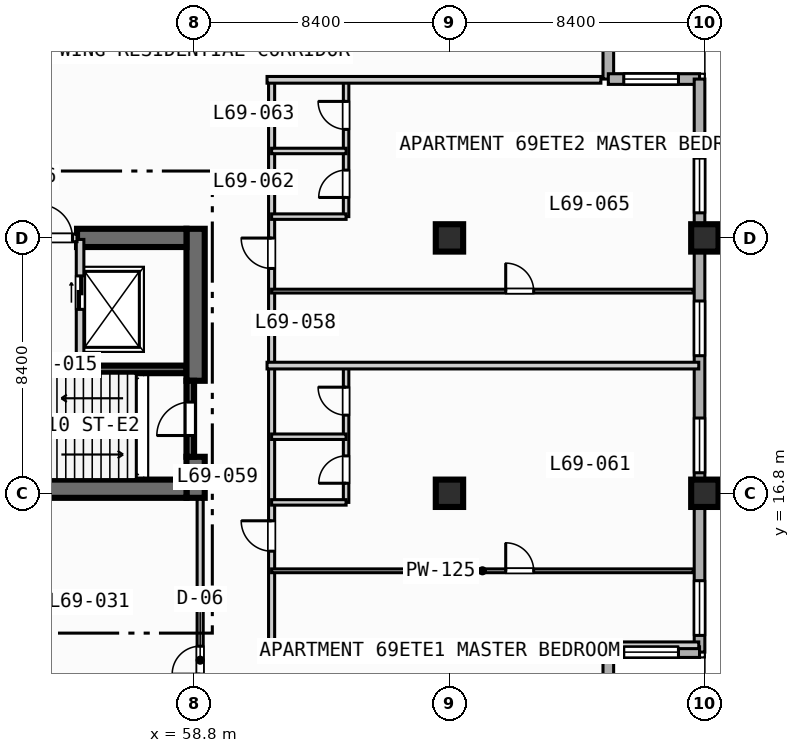
"""IFC4 building model, lengths in metres.
Left out: names, types, materials, properties, quantities, classifications, styles, units other than length and angle.
Written with IfcOpenShell. Run it as: python <this file> out.ifc"""

import sys

from ifc_helpers import new_model, si_unit, direction, frame, frame_2d, origin, origin_2d, place, context, subcontext, project, spatial, rectangle, extrude, element, fill, save


model = new_model("IFC4")
c1 = context("Model", 3, precision=1e-05, world=origin(), true_north=direction((0.0, 1.0)))
c2 = subcontext(c1, "Body", "Model", "MODEL_VIEW")
j1 = project(units=[si_unit("LENGTHUNIT", "METRE"), si_unit("PLANEANGLEUNIT", "RADIAN")], contexts=[c1])
p1 = place(None, origin())
s1 = spatial("IfcSite", under=j1, at=p1, CompositionType="ELEMENT")
p2 = place(p1, origin())
s2 = spatial("IfcBuilding", under=s1, at=p2, CompositionType="ELEMENT")
p3 = place(p2, frame((0.0, 0.0, 278.6)))
s3 = spatial("IfcBuildingStorey", under=s2, at=p3, CompositionType="ELEMENT", Elevation=278.6)
p4 = place(p3, frame((50.5, 20.875, 0.0), z_axis=(0.0, 0.0, 1.0), x_axis=(1.0, 0.0, 0.0)))
e1 = element("IfcWall", 1, at=p4, inside=s3, PredefinedType="SOLIDWALL", context=c2, shape_type="SweptSolid", body=[
    extrude(rectangle(XDim=8.05, YDim=0.25, at=frame_2d((4.025, 0.0))), origin(), (0.0, 0.0, 1.0), 3.47),
])
p5 = place(p3, frame((58.85, 16.65, 0.0), z_axis=(0.0, 0.0, 1.0), x_axis=(0.0, 1.0, 0.0)))
e2 = element("IfcWall", 2, at=p5, inside=s3, PredefinedType="SHEAR", context=c2, shape_type="SweptSolid", body=[
    extrude(rectangle(XDim=1.35, YDim=0.6, at=frame_2d((0.675, 0.0))), origin(), (0.0, 0.0, 1.0), 3.47),
])
p6 = place(p3, frame((58.85, 20.5, 0.0), z_axis=(0.0, 0.0, 1.0), x_axis=(0.0, 1.0, 0.0)))
e3 = element("IfcWall", 3, at=p6, inside=s3, PredefinedType="SHEAR", context=c2, shape_type="SweptSolid", body=[
    extrude(rectangle(XDim=5.0, YDim=0.6, at=frame_2d((2.5, 0.0))), origin(), (0.0, 0.0, 1.0), 3.47),
])
p7 = place(p3, frame((42.2, 16.95, 0.0), z_axis=(0.0, 0.0, 1.0), x_axis=(1.0, 0.0, 0.0)))
e4 = element("IfcWall", 4, at=p7, inside=s3, PredefinedType="SHEAR", context=c2, shape_type="SweptSolid", body=[
    extrude(rectangle(XDim=16.35, YDim=0.6, at=frame_2d((8.175, 0.0))), origin(), (0.0, 0.0, 1.0), 3.47),
])
p8 = place(p3, frame((54.95, 25.2, 0.0), z_axis=(0.0, 0.0, 1.0), x_axis=(1.0, 0.0, 0.0)))
e5 = element("IfcWall", 5, at=p8, inside=s3, PredefinedType="SHEAR", context=c2, shape_type="SweptSolid", body=[
    extrude(rectangle(XDim=3.6, YDim=0.6, at=frame_2d((1.8, 0.0))), origin(), (0.0, 0.0, 1.0), 3.47),
])
for number, where, z_axis, x_axis in (
    (6, (67.2, 16.8, 0.0), (0.0, 0.0, 1.0), (1.0, 0.0, 0.0)),
    (7, (67.2, 25.2, 0.0), (0.0, 0.0, 1.0), (1.0, 0.0, 0.0)),
    (8, (75.6, 16.8, 0.0), (0.0, 0.0, 1.0), (1.0, 0.0, 0.0)),
    (9, (75.6, 25.2, 0.0), (0.0, 0.0, 1.0), (1.0, 0.0, 0.0)),
):
    element("IfcColumn", number, at=place(p3, frame(where, z_axis=z_axis, x_axis=x_axis)), inside=s3, PredefinedType="COLUMN", context=c2, shape_type="SweptSolid", body=[
        extrude(rectangle(XDim=0.9, YDim=0.9, at=origin_2d()), origin(), (0.0, 0.0, 1.0), 3.7),
    ])
p9 = place(p3, frame((72.425, 33.425, 0.0), z_axis=(0.0, 0.0, 1.0), x_axis=(0.0, -1.0, 0.0)))
e10 = element("IfcWall", 10, at=p9, inside=s3, PredefinedType="STANDARD", context=c2, shape_type="SweptSolid", body=[
    extrude(rectangle(XDim=3.0, YDim=0.35, at=frame_2d((1.5, 0.0))), origin(), (0.0, 0.0, 1.0), 3.47),
])
p10 = place(p3, frame((72.425, 30.425, 0.0), z_axis=(0.0, 0.0, 1.0), x_axis=(1.0, 0.0, 0.0)))
e11 = element("IfcWall", 11, at=p10, inside=s3, PredefinedType="STANDARD", context=c2, shape_type="SweptSolid", body=[
    extrude(rectangle(XDim=3.0, YDim=0.35, at=frame_2d((1.5, 0.0))), origin(), (0.0, 0.0, 1.0), 3.47),
])
p11 = place(p10, frame((0.508, 0.0, 0.85)))
e12 = element("IfcOpeningElement", 12, at=p11, cuts=e11, PredefinedType="OPENING", context=c2, shape_type="SweptSolid", body=[
    extrude(rectangle(XDim=1.8, YDim=1.8, at=frame_2d((0.9, 0.9))), frame((0.0, 0.185, 0.0), z_axis=(0.0, -1.0, 0.0), x_axis=(1.0, 0.0, 0.0)), (0.0, 0.0, 1.0), 0.37),
])
p12 = place(p3, frame((75.425, 30.425, 0.0), z_axis=(0.0, 0.0, 1.0), x_axis=(0.0, -1.0, 0.0)))
e13 = element("IfcWall", 13, at=p12, inside=s3, PredefinedType="STANDARD", context=c2, shape_type="SweptSolid", body=[
    extrude(rectangle(XDim=18.85, YDim=0.35, at=frame_2d((9.425, 0.0))), origin(), (0.0, 0.0, 1.0), 3.47),
])
p13 = place(p12, frame((16.5, 0.0, 0.85)))
e14 = element("IfcOpeningElement", 14, at=p13, cuts=e13, PredefinedType="OPENING", context=c2, shape_type="SweptSolid", body=[
    extrude(rectangle(XDim=1.8, YDim=1.8, at=frame_2d((0.9, 0.9))), frame((0.0, 0.185, 0.0), z_axis=(0.0, -1.0, 0.0), x_axis=(1.0, 0.0, 0.0)), (0.0, 0.0, 1.0), 0.37),
])
p14 = place(p12, frame((11.15, 0.0, 0.85)))
e15 = element("IfcOpeningElement", 15, at=p14, cuts=e13, PredefinedType="OPENING", context=c2, shape_type="SweptSolid", body=[
    extrude(rectangle(XDim=1.8, YDim=1.8, at=frame_2d((0.9, 0.9))), frame((0.0, 0.185, 0.0), z_axis=(0.0, -1.0, 0.0), x_axis=(1.0, 0.0, 0.0)), (0.0, 0.0, 1.0), 0.37),
])
p15 = place(p12, frame((7.3, 0.0, 0.85)))
e16 = element("IfcOpeningElement", 16, at=p15, cuts=e13, PredefinedType="OPENING", context=c2, shape_type="SweptSolid", body=[
    extrude(rectangle(XDim=1.8, YDim=1.8, at=frame_2d((0.9, 0.9))), frame((0.0, 0.185, 0.0), z_axis=(0.0, -1.0, 0.0), x_axis=(1.0, 0.0, 0.0)), (0.0, 0.0, 1.0), 0.37),
])
p16 = place(p12, frame((2.6, 0.0, 0.85)))
e17 = element("IfcOpeningElement", 17, at=p16, cuts=e13, PredefinedType="OPENING", context=c2, shape_type="SweptSolid", body=[
    extrude(rectangle(XDim=1.8, YDim=1.8, at=frame_2d((0.9, 0.9))), frame((0.0, 0.185, 0.0), z_axis=(0.0, -1.0, 0.0), x_axis=(1.0, 0.0, 0.0)), (0.0, 0.0, 1.0), 0.37),
])
p17 = place(p3, frame((75.425, 11.575, 0.0), z_axis=(0.0, 0.0, 1.0), x_axis=(-1.0, 0.0, 0.0)))
e18 = element("IfcWall", 18, at=p17, inside=s3, PredefinedType="STANDARD", context=c2, shape_type="SweptSolid", body=[
    extrude(rectangle(XDim=3.0, YDim=0.35, at=frame_2d((1.5, 0.0))), origin(), (0.0, 0.0, 1.0), 3.47),
])
p18 = place(p17, frame((0.692, 0.0, 0.85)))
e19 = element("IfcOpeningElement", 19, at=p18, cuts=e18, PredefinedType="OPENING", context=c2, shape_type="SweptSolid", body=[
    extrude(rectangle(XDim=1.8, YDim=1.8, at=frame_2d((0.9, 0.9))), frame((0.0, 0.185, 0.0), z_axis=(0.0, -1.0, 0.0), x_axis=(1.0, 0.0, 0.0)), (0.0, 0.0, 1.0), 0.37),
])
p19 = place(p3, frame((72.425, 11.575, 0.0), z_axis=(0.0, 0.0, 1.0), x_axis=(0.0, -1.0, 0.0)))
e20 = element("IfcWall", 20, at=p19, inside=s3, PredefinedType="STANDARD", context=c2, shape_type="SweptSolid", body=[
    extrude(rectangle(XDim=3.0, YDim=0.35, at=frame_2d((1.5, 0.0))), origin(), (0.0, 0.0, 1.0), 3.47),
])
p20 = place(p3, frame((58.675, 18.0, 0.0), z_axis=(0.0, 0.0, 1.0), x_axis=(0.0, 1.0, 0.0)))
e21 = element("IfcWall", 21, at=p20, inside=s3, PredefinedType="SOLIDWALL", context=c2, shape_type="SweptSolid", body=[
    extrude(rectangle(XDim=2.5, YDim=0.25, at=frame_2d((1.25, 0.0))), origin(), (0.0, 0.0, 1.0), 3.47),
])
p21 = place(p20, frame((0.7, 0.0, 0.0)))
e22 = element("IfcOpeningElement", 22, at=p21, cuts=e21, PredefinedType="OPENING", context=c2, shape_type="SweptSolid", body=[
    extrude(rectangle(XDim=1.1, YDim=2.15, at=frame_2d((0.55, 1.075))), frame((0.0, 0.135, 0.0), z_axis=(0.0, -1.0, 0.0), x_axis=(1.0, 0.0, 0.0)), (0.0, 0.0, 1.0), 0.27),
])
p22 = place(p3, frame((55.05, 21.0, 0.0), z_axis=(0.0, 0.0, 1.0), x_axis=(0.0, 1.0, 0.0)))
e23 = element("IfcWall", 23, at=p22, inside=s3, PredefinedType="SOLIDWALL", context=c2, shape_type="SweptSolid", body=[
    extrude(rectangle(XDim=4.15, YDim=0.25, at=frame_2d((2.075, 0.0))), origin(), (0.0, 0.0, 1.0), 3.47),
])
p23 = place(p22, frame((1.85, 0.0, 0.0)))
e24 = element("IfcOpeningElement", 24, at=p23, cuts=e23, PredefinedType="OPENING", context=c2, shape_type="SweptSolid", body=[
    extrude(rectangle(XDim=1.1, YDim=2.15, at=frame_2d((0.55, 1.075))), frame((0.0, 0.135, 0.0), z_axis=(0.0, -1.0, 0.0), x_axis=(1.0, 0.0, 0.0)), (0.0, 0.0, 1.0), 0.27),
])
p24 = place(p3, frame((53.55, 25.2, 0.0), z_axis=(0.0, 0.0, 1.0), x_axis=(1.0, 0.0, 0.0)))
e25 = element("IfcWall", 25, at=p24, inside=s3, PredefinedType="SOLIDWALL", context=c2, shape_type="SweptSolid", body=[
    extrude(rectangle(XDim=1.4, YDim=0.25, at=frame_2d((0.7, 0.0))), origin(), (0.0, 0.0, 1.0), 3.47),
])
p25 = place(p24, frame((0.15, 0.0, 0.0)))
e26 = element("IfcOpeningElement", 26, at=p25, cuts=e25, PredefinedType="OPENING", context=c2, shape_type="SweptSolid", body=[
    extrude(rectangle(XDim=1.1, YDim=2.15, at=frame_2d((0.55, 1.075))), frame((0.0, 0.135, 0.0), z_axis=(0.0, -1.0, 0.0), x_axis=(1.0, 0.0, 0.0)), (0.0, 0.0, 1.0), 0.27),
])
p26 = place(p3, frame((59.0, 8.65, 0.0), z_axis=(0.0, 0.0, 1.0), x_axis=(0.0, 1.0, 0.0)))
e27 = element("IfcWall", 27, at=p26, inside=s3, PredefinedType="PARTITIONING", context=c2, shape_type="SweptSolid", body=[
    extrude(rectangle(XDim=7.95, YDim=0.2, at=frame_2d((3.975, 0.0))), origin(), (0.0, 0.0, 1.0), 2.82),
])
p27 = place(p26, frame((2.2, 0.0, 0.0)))
e28 = element("IfcOpeningElement", 28, at=p27, cuts=e27, PredefinedType="OPENING", context=c2, shape_type="SweptSolid", body=[
    extrude(rectangle(XDim=0.92, YDim=2.1, at=frame_2d((0.46, 1.05))), frame((0.0, 0.11, 0.0), z_axis=(0.0, -1.0, 0.0), x_axis=(1.0, 0.0, 0.0)), (0.0, 0.0, 1.0), 0.22),
])
p28 = place(p3, frame((61.35, 11.8, 0.0), z_axis=(0.0, 0.0, 1.0), x_axis=(0.0, 1.0, 0.0)))
e29 = element("IfcWall", 29, at=p28, inside=s3, PredefinedType="PARTITIONING", context=c2, shape_type="SweptSolid", body=[
    extrude(rectangle(XDim=18.6, YDim=0.2, at=frame_2d((9.3, 0.0))), origin(), (0.0, 0.0, 1.0), 3.47),
])
p29 = place(p28, frame((3.095, 0.0, 0.0)))
e30 = element("IfcOpeningElement", 30, at=p29, cuts=e29, PredefinedType="OPENING", context=c2, shape_type="SweptSolid", body=[
    extrude(rectangle(XDim=1.0, YDim=2.15, at=frame_2d((0.5, 1.075))), frame((0.0, 0.11, 0.0), z_axis=(0.0, -1.0, 0.0), x_axis=(1.0, 0.0, 0.0)), (0.0, 0.0, 1.0), 0.22),
])
p30 = place(p28, frame((12.395, 0.0, 0.0)))
e31 = element("IfcOpeningElement", 31, at=p30, cuts=e29, PredefinedType="OPENING", context=c2, shape_type="SweptSolid", body=[
    extrude(rectangle(XDim=1.0, YDim=2.15, at=frame_2d((0.5, 1.075))), frame((0.0, 0.11, 0.0), z_axis=(0.0, -1.0, 0.0), x_axis=(1.0, 0.0, 0.0)), (0.0, 0.0, 1.0), 0.22),
])
p31 = place(p3, frame((61.2, 11.8, 0.0), z_axis=(0.0, 0.0, 1.0), x_axis=(1.0, 0.0, 0.0)))
e32 = element("IfcWall", 32, at=p31, inside=s3, PredefinedType="PARTITIONING", context=c2, shape_type="SweptSolid", body=[
    extrude(rectangle(XDim=14.2, YDim=0.22, at=frame_2d((7.1, 0.0))), origin(), (0.0, 0.0, 1.0), 3.47),
])
p32 = place(p3, frame((63.8, 16.5, 0.0), z_axis=(0.0, 0.0, 1.0), x_axis=(0.0, 1.0, 0.0)))
e33 = element("IfcWall", 33, at=p32, inside=s3, PredefinedType="PLUMBINGWALL", context=c2, shape_type="SweptSolid", body=[
    extrude(rectangle(XDim=4.5, YDim=0.18, at=frame_2d((2.25, 0.0))), origin(), (0.0, 0.0, 1.0), 3.47),
])
p33 = place(p32, frame((0.63, 0.0, 0.0)))
e34 = element("IfcOpeningElement", 34, at=p33, cuts=e33, PredefinedType="OPENING", context=c2, shape_type="SweptSolid", body=[
    extrude(rectangle(XDim=0.9, YDim=2.1, at=frame_2d((0.45, 1.05))), frame((0.0, 0.1, 0.0), z_axis=(0.0, -1.0, 0.0), x_axis=(1.0, 0.0, 0.0)), (0.0, 0.0, 1.0), 0.2),
])
p34 = place(p32, frame((2.87, 0.0, 0.0)))
e35 = element("IfcOpeningElement", 35, at=p34, cuts=e33, PredefinedType="OPENING", context=c2, shape_type="SweptSolid", body=[
    extrude(rectangle(XDim=0.92, YDim=2.1, at=frame_2d((0.46, 1.05))), frame((0.0, 0.1, 0.0), z_axis=(0.0, -1.0, 0.0), x_axis=(1.0, 0.0, 0.0)), (0.0, 0.0, 1.0), 0.2),
])
p35 = place(p3, frame((61.35, 16.5, 0.0), z_axis=(0.0, 0.0, 1.0), x_axis=(1.0, 0.0, 0.0)))
e36 = element("IfcWall", 36, at=p35, inside=s3, PredefinedType="PLUMBINGWALL", context=c2, shape_type="SweptSolid", body=[
    extrude(rectangle(XDim=2.45, YDim=0.18, at=frame_2d((1.225, 0.0))), origin(), (0.0, 0.0, 1.0), 2.82),
])
p36 = place(p3, frame((61.35, 18.66, 0.0), z_axis=(0.0, 0.0, 1.0), x_axis=(1.0, 0.0, 0.0)))
e37 = element("IfcWall", 37, at=p36, inside=s3, PredefinedType="PLUMBINGWALL", context=c2, shape_type="SweptSolid", body=[
    extrude(rectangle(XDim=2.45, YDim=0.18, at=frame_2d((1.225, 0.0))), origin(), (0.0, 0.0, 1.0), 3.47),
])
p37 = place(p3, frame((61.35, 14.25, 0.0), z_axis=(0.0, 0.0, 1.0), x_axis=(1.0, 0.0, 0.0)))
e38 = element("IfcWall", 38, at=p37, inside=s3, PredefinedType="PARTITIONING", context=c2, shape_type="SweptSolid", body=[
    extrude(rectangle(XDim=13.87, YDim=0.125, at=frame_2d((6.935, 0.0))), origin(), (0.0, 0.0, 1.0), 3.47),
])
p38 = place(p37, frame((7.7, 0.0, 0.0)))
e39 = element("IfcOpeningElement", 39, at=p38, cuts=e38, PredefinedType="OPENING", context=c2, shape_type="SweptSolid", body=[
    extrude(rectangle(XDim=0.92, YDim=2.1, at=frame_2d((0.46, 1.05))), frame((0.0, 0.073, 0.0), z_axis=(0.0, -1.0, 0.0), x_axis=(1.0, 0.0, 0.0)), (0.0, 0.0, 1.0), 0.145),
])
p39 = place(p3, frame((61.2, 21.0, 0.0), z_axis=(0.0, 0.0, 1.0), x_axis=(1.0, 0.0, 0.0)))
e40 = element("IfcWall", 40, at=p39, inside=s3, PredefinedType="PARTITIONING", context=c2, shape_type="SweptSolid", body=[
    extrude(rectangle(XDim=14.2, YDim=0.22, at=frame_2d((7.1, 0.0))), origin(), (0.0, 0.0, 1.0), 3.47),
])
p40 = place(p3, frame((63.8, 25.9, 0.0), z_axis=(0.0, 0.0, 1.0), x_axis=(0.0, 1.0, 0.0)))
e41 = element("IfcWall", 41, at=p40, inside=s3, PredefinedType="PLUMBINGWALL", context=c2, shape_type="SweptSolid", body=[
    extrude(rectangle(XDim=4.5, YDim=0.18, at=frame_2d((2.25, 0.0))), origin(), (0.0, 0.0, 1.0), 3.47),
])
p41 = place(p40, frame((0.63, 0.0, 0.0)))
e42 = element("IfcOpeningElement", 42, at=p41, cuts=e41, PredefinedType="OPENING", context=c2, shape_type="SweptSolid", body=[
    extrude(rectangle(XDim=0.9, YDim=2.1, at=frame_2d((0.45, 1.05))), frame((0.0, 0.1, 0.0), z_axis=(0.0, -1.0, 0.0), x_axis=(1.0, 0.0, 0.0)), (0.0, 0.0, 1.0), 0.2),
])
p42 = place(p40, frame((2.87, 0.0, 0.0)))
e43 = element("IfcOpeningElement", 43, at=p42, cuts=e41, PredefinedType="OPENING", context=c2, shape_type="SweptSolid", body=[
    extrude(rectangle(XDim=0.92, YDim=2.1, at=frame_2d((0.46, 1.05))), frame((0.0, 0.1, 0.0), z_axis=(0.0, -1.0, 0.0), x_axis=(1.0, 0.0, 0.0)), (0.0, 0.0, 1.0), 0.2),
])
for number, where, z_axis, x_axis in (
    (44, (61.35, 25.9, 0.0), (0.0, 0.0, 1.0), (1.0, 0.0, 0.0)),
    (45, (61.35, 28.06, 0.0), (0.0, 0.0, 1.0), (1.0, 0.0, 0.0)),
):
    element("IfcWall", number, at=place(p3, frame(where, z_axis=z_axis, x_axis=x_axis)), inside=s3, PredefinedType="PLUMBINGWALL", context=c2, shape_type="SweptSolid", body=[
        extrude(rectangle(XDim=2.45, YDim=0.18, at=frame_2d((1.225, 0.0))), origin(), (0.0, 0.0, 1.0), 3.47),
    ])
p43 = place(p3, frame((61.35, 23.45, 0.0), z_axis=(0.0, 0.0, 1.0), x_axis=(1.0, 0.0, 0.0)))
e46 = element("IfcWall", 46, at=p43, inside=s3, PredefinedType="PARTITIONING", context=c2, shape_type="SweptSolid", body=[
    extrude(rectangle(XDim=13.87, YDim=0.125, at=frame_2d((6.935, 0.0))), origin(), (0.0, 0.0, 1.0), 3.47),
])
p44 = place(p43, frame((7.7, 0.0, 0.0)))
e47 = element("IfcOpeningElement", 47, at=p44, cuts=e46, PredefinedType="OPENING", context=c2, shape_type="SweptSolid", body=[
    extrude(rectangle(XDim=0.92, YDim=2.1, at=frame_2d((0.46, 1.05))), frame((0.0, 0.073, 0.0), z_axis=(0.0, -1.0, 0.0), x_axis=(1.0, 0.0, 0.0)), (0.0, 0.0, 1.0), 0.145),
])
p45 = place(p3, frame((61.2, 30.4, 0.0), z_axis=(0.0, 0.0, 1.0), x_axis=(1.0, 0.0, 0.0)))
e48 = element("IfcWall", 48, at=p45, inside=s3, PredefinedType="PARTITIONING", context=c2, shape_type="SweptSolid", body=[
    extrude(rectangle(XDim=10.98, YDim=0.22, at=frame_2d((5.49, 0.0))), origin(), (0.0, 0.0, 1.0), 3.47),
])
p46 = place(p11, origin())
e49 = element("IfcWindow", 49, at=p46, inside=s3, PartitioningType="SINGLE_PANEL", PredefinedType="WINDOW", context=c2, shape_type="SweptSolid", body=[
    extrude(rectangle(XDim=1.8, YDim=1.8, at=frame_2d((0.9, 0.9))), frame((0.0, 0.03, 0.0), z_axis=(0.0, -1.0, 0.0), x_axis=(1.0, 0.0, 0.0)), (0.0, 0.0, 1.0), 0.06),
])
fill(e12, e49)
p47 = place(p13, origin())
e50 = element("IfcWindow", 50, at=p47, inside=s3, PartitioningType="SINGLE_PANEL", PredefinedType="WINDOW", context=c2, shape_type="SweptSolid", body=[
    extrude(rectangle(XDim=1.8, YDim=1.8, at=frame_2d((0.9, 0.9))), frame((0.0, 0.03, 0.0), z_axis=(0.0, -1.0, 0.0), x_axis=(1.0, 0.0, 0.0)), (0.0, 0.0, 1.0), 0.06),
])
fill(e14, e50)
p48 = place(p14, origin())
e51 = element("IfcWindow", 51, at=p48, inside=s3, PartitioningType="SINGLE_PANEL", PredefinedType="WINDOW", context=c2, shape_type="SweptSolid", body=[
    extrude(rectangle(XDim=1.8, YDim=1.8, at=frame_2d((0.9, 0.9))), frame((0.0, 0.03, 0.0), z_axis=(0.0, -1.0, 0.0), x_axis=(1.0, 0.0, 0.0)), (0.0, 0.0, 1.0), 0.06),
])
fill(e15, e51)
p49 = place(p15, origin())
e52 = element("IfcWindow", 52, at=p49, inside=s3, PartitioningType="SINGLE_PANEL", PredefinedType="WINDOW", context=c2, shape_type="SweptSolid", body=[
    extrude(rectangle(XDim=1.8, YDim=1.8, at=frame_2d((0.9, 0.9))), frame((0.0, 0.03, 0.0), z_axis=(0.0, -1.0, 0.0), x_axis=(1.0, 0.0, 0.0)), (0.0, 0.0, 1.0), 0.06),
])
fill(e16, e52)
p50 = place(p16, origin())
e53 = element("IfcWindow", 53, at=p50, inside=s3, PartitioningType="SINGLE_PANEL", PredefinedType="WINDOW", context=c2, shape_type="SweptSolid", body=[
    extrude(rectangle(XDim=1.8, YDim=1.8, at=frame_2d((0.9, 0.9))), frame((0.0, 0.03, 0.0), z_axis=(0.0, -1.0, 0.0), x_axis=(1.0, 0.0, 0.0)), (0.0, 0.0, 1.0), 0.06),
])
fill(e17, e53)
p51 = place(p18, origin())
e54 = element("IfcWindow", 54, at=p51, inside=s3, PartitioningType="SINGLE_PANEL", PredefinedType="WINDOW", context=c2, shape_type="SweptSolid", body=[
    extrude(rectangle(XDim=1.8, YDim=1.8, at=frame_2d((0.9, 0.9))), frame((0.0, 0.03, 0.0), z_axis=(0.0, -1.0, 0.0), x_axis=(1.0, 0.0, 0.0)), (0.0, 0.0, 1.0), 0.06),
])
fill(e19, e54)
p52 = place(p21, origin())
e55 = element("IfcDoor", 55, at=p52, inside=s3, OperationType="SINGLE_SWING_LEFT", PredefinedType="DOOR", context=c2, shape_type="SweptSolid", body=[
    extrude(rectangle(XDim=1.1, YDim=2.15, at=frame_2d((0.55, 1.075))), frame((0.0, 0.025, 0.0), z_axis=(0.0, -1.0, 0.0), x_axis=(1.0, 0.0, 0.0)), (0.0, 0.0, 1.0), 0.05),
])
fill(e22, e55)
p53 = place(p23, origin())
e56 = element("IfcDoor", 56, at=p53, inside=s3, OperationType="SLIDING_TO_LEFT", PredefinedType="DOOR", context=c2, shape_type="SweptSolid", body=[
    extrude(rectangle(XDim=1.1, YDim=2.15, at=frame_2d((0.55, 1.075))), frame((0.0, 0.025, 0.0), z_axis=(0.0, -1.0, 0.0), x_axis=(1.0, 0.0, 0.0)), (0.0, 0.0, 1.0), 0.05),
])
fill(e24, e56)
p54 = place(p25, origin())
e57 = element("IfcDoor", 57, at=p54, inside=s3, OperationType="SINGLE_SWING_LEFT", PredefinedType="DOOR", context=c2, shape_type="SweptSolid", body=[
    extrude(rectangle(XDim=1.1, YDim=2.15, at=frame_2d((0.55, 1.075))), frame((0.0, 0.025, 0.0), z_axis=(0.0, -1.0, 0.0), x_axis=(1.0, 0.0, 0.0)), (0.0, 0.0, 1.0), 0.05),
])
fill(e26, e57)
p55 = place(p27, origin())
e58 = element("IfcDoor", 58, at=p55, inside=s3, OperationType="SINGLE_SWING_LEFT", PredefinedType="DOOR", context=c2, shape_type="SweptSolid", body=[
    extrude(rectangle(XDim=0.92, YDim=2.1, at=frame_2d((0.46, 1.05))), frame((0.0, 0.025, 0.0), z_axis=(0.0, -1.0, 0.0), x_axis=(1.0, 0.0, 0.0)), (0.0, 0.0, 1.0), 0.05),
])
fill(e28, e58)
p56 = place(p29, origin())
e59 = element("IfcDoor", 59, at=p56, inside=s3, OperationType="SINGLE_SWING_RIGHT", PredefinedType="DOOR", context=c2, shape_type="SweptSolid", body=[
    extrude(rectangle(XDim=1.0, YDim=2.15, at=frame_2d((0.5, 1.075))), frame((0.0, 0.025, 0.0), z_axis=(0.0, -1.0, 0.0), x_axis=(1.0, 0.0, 0.0)), (0.0, 0.0, 1.0), 0.05),
])
fill(e30, e59)
p57 = place(p30, origin())
e60 = element("IfcDoor", 60, at=p57, inside=s3, OperationType="SINGLE_SWING_RIGHT", PredefinedType="DOOR", context=c2, shape_type="SweptSolid", body=[
    extrude(rectangle(XDim=1.0, YDim=2.15, at=frame_2d((0.5, 1.075))), frame((0.0, 0.025, 0.0), z_axis=(0.0, -1.0, 0.0), x_axis=(1.0, 0.0, 0.0)), (0.0, 0.0, 1.0), 0.05),
])
fill(e31, e60)
p58 = place(p33, origin())
e61 = element("IfcDoor", 61, at=p58, inside=s3, OperationType="SINGLE_SWING_LEFT", PredefinedType="DOOR", context=c2, shape_type="SweptSolid", body=[
    extrude(rectangle(XDim=0.9, YDim=2.1, at=frame_2d((0.45, 1.05))), frame((0.0, 0.025, 0.0), z_axis=(0.0, -1.0, 0.0), x_axis=(1.0, 0.0, 0.0)), (0.0, 0.0, 1.0), 0.05),
])
fill(e34, e61)
p59 = place(p34, origin())
e62 = element("IfcDoor", 62, at=p59, inside=s3, OperationType="SINGLE_SWING_RIGHT", PredefinedType="DOOR", context=c2, shape_type="SweptSolid", body=[
    extrude(rectangle(XDim=0.92, YDim=2.1, at=frame_2d((0.46, 1.05))), frame((0.0, 0.025, 0.0), z_axis=(0.0, -1.0, 0.0), x_axis=(1.0, 0.0, 0.0)), (0.0, 0.0, 1.0), 0.05),
])
fill(e35, e62)
p60 = place(p38, origin())
e63 = element("IfcDoor", 63, at=p60, inside=s3, OperationType="SINGLE_SWING_LEFT", PredefinedType="DOOR", context=c2, shape_type="SweptSolid", body=[
    extrude(rectangle(XDim=0.92, YDim=2.1, at=frame_2d((0.46, 1.05))), frame((0.0, 0.025, 0.0), z_axis=(0.0, -1.0, 0.0), x_axis=(1.0, 0.0, 0.0)), (0.0, 0.0, 1.0), 0.05),
])
fill(e39, e63)
p61 = place(p41, origin())
e64 = element("IfcDoor", 64, at=p61, inside=s3, OperationType="SINGLE_SWING_LEFT", PredefinedType="DOOR", context=c2, shape_type="SweptSolid", body=[
    extrude(rectangle(XDim=0.9, YDim=2.1, at=frame_2d((0.45, 1.05))), frame((0.0, 0.025, 0.0), z_axis=(0.0, -1.0, 0.0), x_axis=(1.0, 0.0, 0.0)), (0.0, 0.0, 1.0), 0.05),
])
fill(e42, e64)
p62 = place(p42, origin())
e65 = element("IfcDoor", 65, at=p62, inside=s3, OperationType="SINGLE_SWING_RIGHT", PredefinedType="DOOR", context=c2, shape_type="SweptSolid", body=[
    extrude(rectangle(XDim=0.92, YDim=2.1, at=frame_2d((0.46, 1.05))), frame((0.0, 0.025, 0.0), z_axis=(0.0, -1.0, 0.0), x_axis=(1.0, 0.0, 0.0)), (0.0, 0.0, 1.0), 0.05),
])
fill(e43, e65)
p63 = place(p44, origin())
e66 = element("IfcDoor", 66, at=p63, inside=s3, OperationType="SINGLE_SWING_LEFT", PredefinedType="DOOR", context=c2, shape_type="SweptSolid", body=[
    extrude(rectangle(XDim=0.92, YDim=2.1, at=frame_2d((0.46, 1.05))), frame((0.0, 0.025, 0.0), z_axis=(0.0, -1.0, 0.0), x_axis=(1.0, 0.0, 0.0)), (0.0, 0.0, 1.0), 0.05),
])
fill(e47, e66)
save(model, sys.argv[1])
